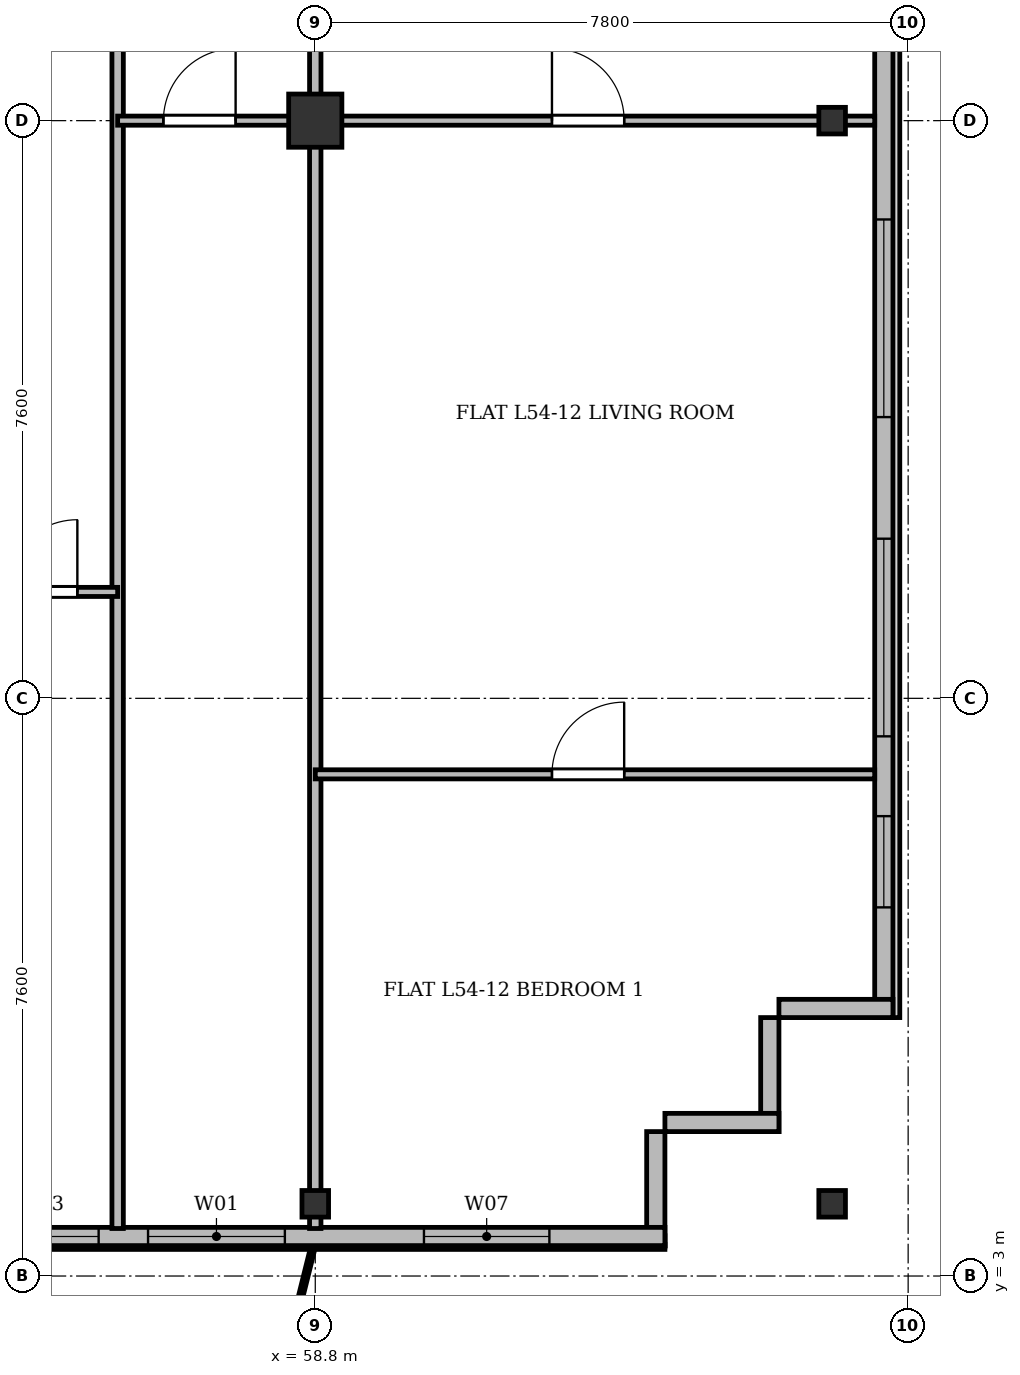
"""IFC4 building model, lengths in metres.
Left out: names, types, materials, properties, quantities, classifications, styles, units other than length and angle.
Written with IfcOpenShell. Run it as: python <this file> out.ifc"""

import sys

from ifc_helpers import new_model, si_unit, direction, frame, frame_2d, origin, origin_2d, place, context, subcontext, project, spatial, rectangle, i_section, extrude, source, transform, mapped, element, fill, save


model = new_model("IFC4")
c1 = context("Model", 3, precision=1e-05, world=origin(), true_north=direction((0.0, 1.0)))
c2 = subcontext(c1, "Body", "Model", "MODEL_VIEW")
j1 = project(units=[si_unit("LENGTHUNIT", "METRE"), si_unit("PLANEANGLEUNIT", "RADIAN")], contexts=[c1])
p1 = place(None, origin())
s1 = spatial("IfcSite", under=j1, at=p1, CompositionType="ELEMENT")
p2 = place(p1, origin())
s2 = spatial("IfcBuilding", under=s1, at=p2, CompositionType="ELEMENT")
p3 = place(p2, frame((0.0, 0.0, 208.5)))
s3 = spatial("IfcBuildingStorey", under=s2, at=p3, CompositionType="ELEMENT", Elevation=208.5)
m1 = source(origin(), c2, "Body", "SweptSolid", [
    extrude(i_section(OverallWidth=0.35, OverallDepth=0.35, WebThickness=0.018, FlangeThickness=0.028, at=origin_2d()), origin(), (0.0, 0.0, 1.0), 3.6),
])
p4 = place(p3, frame((58.8, 3.95, 0.0), z_axis=(0.0, 0.0, 1.0), x_axis=(1.0, 0.0, 0.0)))
e1 = element("IfcColumn", 1, at=p4, inside=s3, PredefinedType="COLUMN", context=c2, shape_type="MappedRepresentation", body=[
    mapped(m1, transform((0.0, 0.0, 0.0), x_axis=(1.0, 0.0, 0.0), y_axis=(0.0, 1.0, 0.0), z_axis=(0.0, 0.0, 1.0), scale=1.0)),
])
m2 = source(origin(), c2, "Body", "SweptSolid", [
    extrude(rectangle(XDim=0.7, YDim=0.7, at=origin_2d()), origin(), (0.0, 0.0, 1.0), 3.6),
])
p5 = place(p3, frame((58.8, 18.2, 0.0), z_axis=(0.0, 0.0, 1.0), x_axis=(1.0, 0.0, 0.0)))
e2 = element("IfcColumn", 2, at=p5, inside=s3, PredefinedType="COLUMN", context=c2, shape_type="MappedRepresentation", body=[
    mapped(m2, transform((0.0, 0.0, 0.0), x_axis=(1.0, 0.0, 0.0), y_axis=(0.0, 1.0, 0.0), z_axis=(0.0, 0.0, 1.0), scale=1.0)),
])
for number, where, z_axis, x_axis in (
    (3, (65.6, 3.95, 0.0), (0.0, 0.0, 1.0), (1.0, 0.0, 0.0)),
    (4, (65.6, 18.2, 0.0), (0.0, 0.0, 1.0), (1.0, 0.0, 0.0)),
):
    element("IfcColumn", number, at=place(p3, frame(where, z_axis=z_axis, x_axis=x_axis)), inside=s3, PredefinedType="COLUMN", context=c2, shape_type="MappedRepresentation", body=[
        mapped(m1, transform((0.0, 0.0, 0.0), x_axis=(1.0, 0.0, 0.0), y_axis=(0.0, 1.0, 0.0), z_axis=(0.0, 0.0, 1.0), scale=1.0)),
    ])
p6 = place(p3, frame((66.28, 45.5, 0.0), z_axis=(0.0, 0.0, 1.0), x_axis=(0.0, -1.0, 0.0)))
e5 = element("IfcWall", 5, at=p6, inside=s3, PredefinedType="SOLIDWALL", context=c2, shape_type="SweptSolid", body=[
    extrude(rectangle(XDim=39.1, YDim=0.24, at=frame_2d((19.55, 0.0))), origin(), (0.0, 0.0, 1.0), 3.36),
])
p7 = place(p6, frame((36.45, 0.0, 0.92)))
e6 = element("IfcOpeningElement", 6, at=p7, cuts=e5, PredefinedType="OPENING", context=c2, shape_type="SweptSolid", body=[
    extrude(rectangle(XDim=1.2, YDim=1.65, at=frame_2d((0.6, 0.825))), frame((0.0, 0.13, 0.0), z_axis=(0.0, -1.0, 0.0), x_axis=(1.0, 0.0, 0.0)), (0.0, 0.0, 1.0), 0.26),
])
p8 = place(p6, frame((32.8, 0.0, 0.92)))
e7 = element("IfcOpeningElement", 7, at=p8, cuts=e5, PredefinedType="OPENING", context=c2, shape_type="SweptSolid", body=[
    extrude(rectangle(XDim=2.6, YDim=1.9, at=frame_2d((1.3, 0.95))), frame((0.0, 0.13, 0.0), z_axis=(0.0, -1.0, 0.0), x_axis=(1.0, 0.0, 0.0)), (0.0, 0.0, 1.0), 0.26),
])
p9 = place(p6, frame((28.6, 0.0, 0.92)))
e8 = element("IfcOpeningElement", 8, at=p9, cuts=e5, PredefinedType="OPENING", context=c2, shape_type="SweptSolid", body=[
    extrude(rectangle(XDim=2.6, YDim=1.9, at=frame_2d((1.3, 0.95))), frame((0.0, 0.13, 0.0), z_axis=(0.0, -1.0, 0.0), x_axis=(1.0, 0.0, 0.0)), (0.0, 0.0, 1.0), 0.26),
])
p10 = place(p6, frame((21.4, 0.0, 0.92)))
e9 = element("IfcOpeningElement", 9, at=p10, cuts=e5, PredefinedType="OPENING", context=c2, shape_type="SweptSolid", body=[
    extrude(rectangle(XDim=2.6, YDim=1.9, at=frame_2d((1.3, 0.95))), frame((0.0, 0.13, 0.0), z_axis=(0.0, -1.0, 0.0), x_axis=(1.0, 0.0, 0.0)), (0.0, 0.0, 1.0), 0.26),
])
p11 = place(p6, frame((7.4, 0.0, 0.92)))
e10 = element("IfcOpeningElement", 10, at=p11, cuts=e5, PredefinedType="OPENING", context=c2, shape_type="SweptSolid", body=[
    extrude(rectangle(XDim=2.6, YDim=1.9, at=frame_2d((1.3, 0.95))), frame((0.0, 0.13, 0.0), z_axis=(0.0, -1.0, 0.0), x_axis=(1.0, 0.0, 0.0)), (0.0, 0.0, 1.0), 0.26),
])
p12 = place(p6, frame((4.5, 0.0, 0.92)))
e11 = element("IfcOpeningElement", 11, at=p12, cuts=e5, PredefinedType="OPENING", context=c2, shape_type="SweptSolid", body=[
    extrude(rectangle(XDim=1.2, YDim=1.65, at=frame_2d((0.6, 0.825))), frame((0.0, 0.13, 0.0), z_axis=(0.0, -1.0, 0.0), x_axis=(1.0, 0.0, 0.0)), (0.0, 0.0, 1.0), 0.26),
])
p13 = place(p6, frame((1.15, 0.0, 0.92)))
e12 = element("IfcOpeningElement", 12, at=p13, cuts=e5, PredefinedType="OPENING", context=c2, shape_type="SweptSolid", body=[
    extrude(rectangle(XDim=1.2, YDim=1.65, at=frame_2d((0.6, 0.825))), frame((0.0, 0.13, 0.0), z_axis=(0.0, -1.0, 0.0), x_axis=(1.0, 0.0, 0.0)), (0.0, 0.0, 1.0), 0.26),
])
p14 = place(p3, frame((66.4, 6.52, 0.0), z_axis=(0.0, 0.0, 1.0), x_axis=(-1.0, 0.0, 0.0)))
e13 = element("IfcWall", 13, at=p14, inside=s3, PredefinedType="SOLIDWALL", context=c2, shape_type="SweptSolid", body=[
    extrude(rectangle(XDim=1.5, YDim=0.24, at=frame_2d((0.75, 0.0))), origin(), (0.0, 0.0, 1.0), 2.86),
])
for number, where, z_axis, x_axis in (
    (14, (64.78, 6.4, 0.0), (0.0, 0.0, 1.0), (0.0, -1.0, 0.0)),
    (15, (64.9, 5.02, 0.0), (0.0, 0.0, 1.0), (-1.0, 0.0, 0.0)),
):
    element("IfcWall", number, at=place(p3, frame(where, z_axis=z_axis, x_axis=x_axis)), inside=s3, PredefinedType="SOLIDWALL", context=c2, shape_type="SweptSolid", body=[
        extrude(rectangle(XDim=1.5, YDim=0.24, at=frame_2d((0.75, 0.0))), origin(), (0.0, 0.0, 1.0), 3.36),
    ])
p15 = place(p3, frame((63.28, 4.9, 0.0), z_axis=(0.0, 0.0, 1.0), x_axis=(0.0, -1.0, 0.0)))
e16 = element("IfcWall", 16, at=p15, inside=s3, PredefinedType="SOLIDWALL", context=c2, shape_type="SweptSolid", body=[
    extrude(rectangle(XDim=1.5, YDim=0.24, at=frame_2d((0.75, 0.0))), origin(), (0.0, 0.0, 1.0), 2.91),
])
p16 = place(p3, frame((63.4, 3.52, 0.0), z_axis=(0.0, 0.0, 1.0), x_axis=(-1.0, 0.0, 0.0)))
e17 = element("IfcWall", 17, at=p16, inside=s3, PredefinedType="SOLIDWALL", context=c2, shape_type="SweptSolid", body=[
    extrude(rectangle(XDim=52.4, YDim=0.24, at=frame_2d((26.2, 0.0))), origin(), (0.0, 0.0, 1.0), 3.36),
])
p17 = place(p16, frame((1.52, 0.0, 0.9)))
e18 = element("IfcOpeningElement", 18, at=p17, cuts=e17, PredefinedType="OPENING", context=c2, shape_type="SweptSolid", body=[
    extrude(rectangle(XDim=1.65, YDim=1.85, at=frame_2d((0.825, 0.925))), frame((0.0, 0.13, 0.0), z_axis=(0.0, -1.0, 0.0), x_axis=(1.0, 0.0, 0.0)), (0.0, 0.0, 1.0), 0.26),
])
p18 = place(p16, frame((5.0, 0.0, 0.9)))
e19 = element("IfcOpeningElement", 19, at=p18, cuts=e17, PredefinedType="OPENING", context=c2, shape_type="SweptSolid", body=[
    extrude(rectangle(XDim=1.8, YDim=1.8, at=frame_2d((0.9, 0.9))), frame((0.0, 0.13, 0.0), z_axis=(0.0, -1.0, 0.0), x_axis=(1.0, 0.0, 0.0)), (0.0, 0.0, 1.0), 0.26),
])
p19 = place(p16, frame((7.45, 0.0, 0.9)))
e20 = element("IfcOpeningElement", 20, at=p19, cuts=e17, PredefinedType="OPENING", context=c2, shape_type="SweptSolid", body=[
    extrude(rectangle(XDim=1.5, YDim=1.75, at=frame_2d((0.75, 0.875))), frame((0.0, 0.13, 0.0), z_axis=(0.0, -1.0, 0.0), x_axis=(1.0, 0.0, 0.0)), (0.0, 0.0, 1.0), 0.26),
])
p20 = place(p16, frame((10.05, 0.0, 0.9)))
e21 = element("IfcOpeningElement", 21, at=p20, cuts=e17, PredefinedType="OPENING", context=c2, shape_type="SweptSolid", body=[
    extrude(rectangle(XDim=1.5, YDim=1.75, at=frame_2d((0.75, 0.875))), frame((0.0, 0.13, 0.0), z_axis=(0.0, -1.0, 0.0), x_axis=(1.0, 0.0, 0.0)), (0.0, 0.0, 1.0), 0.26),
])
p21 = place(p16, frame((14.217, 0.0, 0.0)))
e22 = element("IfcOpeningElement", 22, at=p21, cuts=e17, PredefinedType="OPENING", context=c2, shape_type="SweptSolid", body=[
    extrude(rectangle(XDim=1.2, YDim=2.2, at=frame_2d((0.6, 1.1))), frame((0.0, 0.13, 0.0), z_axis=(0.0, -1.0, 0.0), x_axis=(1.0, 0.0, 0.0)), (0.0, 0.0, 1.0), 0.26),
])
p22 = place(p16, frame((20.108, 0.0, 0.9)))
e23 = element("IfcOpeningElement", 23, at=p22, cuts=e17, PredefinedType="OPENING", context=c2, shape_type="SweptSolid", body=[
    extrude(rectangle(XDim=1.65, YDim=1.85, at=frame_2d((0.825, 0.925))), frame((0.0, 0.13, 0.0), z_axis=(0.0, -1.0, 0.0), x_axis=(1.0, 0.0, 0.0)), (0.0, 0.0, 1.0), 0.26),
])
p23 = place(p16, frame((22.7, 0.0, 0.9)))
e24 = element("IfcOpeningElement", 24, at=p23, cuts=e17, PredefinedType="OPENING", context=c2, shape_type="SweptSolid", body=[
    extrude(rectangle(XDim=1.8, YDim=1.8, at=frame_2d((0.9, 0.9))), frame((0.0, 0.13, 0.0), z_axis=(0.0, -1.0, 0.0), x_axis=(1.0, 0.0, 0.0)), (0.0, 0.0, 1.0), 0.26),
])
p24 = place(p16, frame((25.166, 0.0, 0.9)))
e25 = element("IfcOpeningElement", 25, at=p24, cuts=e17, PredefinedType="OPENING", context=c2, shape_type="SweptSolid", body=[
    extrude(rectangle(XDim=2.2, YDim=1.8, at=frame_2d((1.1, 0.9))), frame((0.0, 0.13, 0.0), z_axis=(0.0, -1.0, 0.0), x_axis=(1.0, 0.0, 0.0)), (0.0, 0.0, 1.0), 0.26),
])
p25 = place(p16, frame((29.45, 0.0, 0.9)))
e26 = element("IfcOpeningElement", 26, at=p25, cuts=e17, PredefinedType="OPENING", context=c2, shape_type="SweptSolid", body=[
    extrude(rectangle(XDim=1.5, YDim=1.75, at=frame_2d((0.75, 0.875))), frame((0.0, 0.13, 0.0), z_axis=(0.0, -1.0, 0.0), x_axis=(1.0, 0.0, 0.0)), (0.0, 0.0, 1.0), 0.26),
])
p26 = place(p16, frame((33.0, 0.0, 0.9)))
e27 = element("IfcOpeningElement", 27, at=p26, cuts=e17, PredefinedType="OPENING", context=c2, shape_type="SweptSolid", body=[
    extrude(rectangle(XDim=2.0, YDim=1.95, at=frame_2d((1.0, 0.975))), frame((0.0, 0.13, 0.0), z_axis=(0.0, -1.0, 0.0), x_axis=(1.0, 0.0, 0.0)), (0.0, 0.0, 1.0), 0.26),
])
p27 = place(p16, frame((35.575, 0.0, 0.9)))
e28 = element("IfcOpeningElement", 28, at=p27, cuts=e17, PredefinedType="OPENING", context=c2, shape_type="SweptSolid", body=[
    extrude(rectangle(XDim=1.65, YDim=1.85, at=frame_2d((0.825, 0.925))), frame((0.0, 0.13, 0.0), z_axis=(0.0, -1.0, 0.0), x_axis=(1.0, 0.0, 0.0)), (0.0, 0.0, 1.0), 0.26),
])
p28 = place(p16, frame((37.9, 0.0, 0.9)))
e29 = element("IfcOpeningElement", 29, at=p28, cuts=e17, PredefinedType="OPENING", context=c2, shape_type="SweptSolid", body=[
    extrude(rectangle(XDim=1.8, YDim=1.8, at=frame_2d((0.9, 0.9))), frame((0.0, 0.13, 0.0), z_axis=(0.0, -1.0, 0.0), x_axis=(1.0, 0.0, 0.0)), (0.0, 0.0, 1.0), 0.26),
])
p29 = place(p16, frame((41.456, 0.0, 0.0)))
e30 = element("IfcOpeningElement", 30, at=p29, cuts=e17, PredefinedType="OPENING", context=c2, shape_type="SweptSolid", body=[
    extrude(rectangle(XDim=1.2, YDim=2.2, at=frame_2d((0.6, 1.1))), frame((0.0, 0.13, 0.0), z_axis=(0.0, -1.0, 0.0), x_axis=(1.0, 0.0, 0.0)), (0.0, 0.0, 1.0), 0.26),
])
p30 = place(p16, frame((43.45, 0.0, 0.9)))
e31 = element("IfcOpeningElement", 31, at=p30, cuts=e17, PredefinedType="OPENING", context=c2, shape_type="SweptSolid", body=[
    extrude(rectangle(XDim=1.5, YDim=1.75, at=frame_2d((0.75, 0.875))), frame((0.0, 0.13, 0.0), z_axis=(0.0, -1.0, 0.0), x_axis=(1.0, 0.0, 0.0)), (0.0, 0.0, 1.0), 0.26),
])
p31 = place(p16, frame((45.5, 0.0, 0.9)))
e32 = element("IfcOpeningElement", 32, at=p31, cuts=e17, PredefinedType="OPENING", context=c2, shape_type="SweptSolid", body=[
    extrude(rectangle(XDim=2.0, YDim=1.95, at=frame_2d((1.0, 0.975))), frame((0.0, 0.13, 0.0), z_axis=(0.0, -1.0, 0.0), x_axis=(1.0, 0.0, 0.0)), (0.0, 0.0, 1.0), 0.26),
])
p32 = place(p16, frame((49.23, 0.0, 0.9)))
e33 = element("IfcOpeningElement", 33, at=p32, cuts=e17, PredefinedType="OPENING", context=c2, shape_type="SweptSolid", body=[
    extrude(rectangle(XDim=1.65, YDim=1.85, at=frame_2d((0.825, 0.925))), frame((0.0, 0.13, 0.0), z_axis=(0.0, -1.0, 0.0), x_axis=(1.0, 0.0, 0.0)), (0.0, 0.0, 1.0), 0.26),
])
p33 = place(p3, frame((58.8, 3.625, 0.0), z_axis=(0.0, 0.0, 1.0), x_axis=(0.0, 1.0, 0.0)))
e34 = element("IfcWall", 34, at=p33, inside=s3, PredefinedType="PARTITIONING", context=c2, shape_type="SweptSolid", body=[
    extrude(rectangle(XDim=27.175, YDim=0.15, at=frame_2d((13.587, 0.0))), origin(), (0.0, 0.0, 1.0), 2.86),
])
p34 = place(p3, frame((56.2, 3.625, 0.0), z_axis=(0.0, 0.0, 1.0), x_axis=(0.0, 1.0, 0.0)))
e35 = element("IfcWall", 35, at=p34, inside=s3, PredefinedType="PARTITIONING", context=c2, shape_type="SweptSolid", body=[
    extrude(rectangle(XDim=27.175, YDim=0.15, at=frame_2d((13.587, 0.0))), origin(), (0.0, 0.0, 1.0), 2.91),
])
p35 = place(p3, frame((54.2, 12.0, 0.0), z_axis=(0.0, 0.0, 1.0), x_axis=(1.0, 0.0, 0.0)))
e36 = element("IfcWall", 36, at=p35, inside=s3, PredefinedType="PARTITIONING", context=c2, shape_type="SweptSolid", body=[
    extrude(rectangle(XDim=2.0, YDim=0.12, at=frame_2d((1.0, 0.0))), origin(), (0.0, 0.0, 1.0), 3.36),
])
p36 = place(p35, frame((0.52, 0.0, 0.0)))
e37 = element("IfcOpeningElement", 37, at=p36, cuts=e36, PredefinedType="OPENING", context=c2, shape_type="SweptSolid", body=[
    extrude(rectangle(XDim=0.95, YDim=2.15, at=frame_2d((0.475, 1.075))), frame((0.0, 0.07, 0.0), z_axis=(0.0, -1.0, 0.0), x_axis=(1.0, 0.0, 0.0)), (0.0, 0.0, 1.0), 0.14),
])
p37 = place(p3, frame((56.2, 18.2, 0.0), z_axis=(0.0, 0.0, 1.0), x_axis=(1.0, 0.0, 0.0)))
e38 = element("IfcWall", 38, at=p37, inside=s3, PredefinedType="PARTITIONING", context=c2, shape_type="SweptSolid", body=[
    extrude(rectangle(XDim=2.6, YDim=0.12, at=frame_2d((1.3, 0.0))), origin(), (0.0, 0.0, 1.0), 2.91),
])
p38 = place(p37, frame((0.602, 0.0, 0.0)))
e39 = element("IfcOpeningElement", 39, at=p38, cuts=e38, PredefinedType="OPENING", context=c2, shape_type="SweptSolid", body=[
    extrude(rectangle(XDim=0.95, YDim=2.15, at=frame_2d((0.475, 1.075))), frame((0.0, 0.07, 0.0), z_axis=(0.0, -1.0, 0.0), x_axis=(1.0, 0.0, 0.0)), (0.0, 0.0, 1.0), 0.14),
])
p39 = place(p3, frame((58.8, 18.2, 0.0), z_axis=(0.0, 0.0, 1.0), x_axis=(1.0, 0.0, 0.0)))
e40 = element("IfcWall", 40, at=p39, inside=s3, PredefinedType="PARTITIONING", context=c2, shape_type="SweptSolid", body=[
    extrude(rectangle(XDim=7.36, YDim=0.12, at=frame_2d((3.68, 0.0))), origin(), (0.0, 0.0, 1.0), 2.91),
])
p40 = place(p39, frame((3.114, 0.0, 0.0)))
e41 = element("IfcOpeningElement", 41, at=p40, cuts=e40, PredefinedType="OPENING", context=c2, shape_type="SweptSolid", body=[
    extrude(rectangle(XDim=0.95, YDim=2.15, at=frame_2d((0.475, 1.075))), frame((0.0, 0.07, 0.0), z_axis=(0.0, -1.0, 0.0), x_axis=(1.0, 0.0, 0.0)), (0.0, 0.0, 1.0), 0.14),
])
p41 = place(p3, frame((58.8, 9.6, 0.0), z_axis=(0.0, 0.0, 1.0), x_axis=(1.0, 0.0, 0.0)))
e42 = element("IfcWall", 42, at=p41, inside=s3, PredefinedType="PARTITIONING", context=c2, shape_type="SweptSolid", body=[
    extrude(rectangle(XDim=7.36, YDim=0.12, at=frame_2d((3.68, 0.0))), origin(), (0.0, 0.0, 1.0), 2.86),
])
p42 = place(p41, frame((3.114, 0.0, 0.0)))
e43 = element("IfcOpeningElement", 43, at=p42, cuts=e42, PredefinedType="OPENING", context=c2, shape_type="SweptSolid", body=[
    extrude(rectangle(XDim=0.95, YDim=2.15, at=frame_2d((0.475, 1.075))), frame((0.0, 0.07, 0.0), z_axis=(0.0, -1.0, 0.0), x_axis=(1.0, 0.0, 0.0)), (0.0, 0.0, 1.0), 0.14),
])
m3 = source(origin(), c2, "Body", "SweptSolid", [
    extrude(rectangle(XDim=1.2, YDim=1.65, at=frame_2d((0.6, 0.825))), frame((0.0, 0.03, 0.0), z_axis=(0.0, -1.0, 0.0), x_axis=(1.0, 0.0, 0.0)), (0.0, 0.0, 1.0), 0.06),
])
p43 = place(p7, origin())
e44 = element("IfcWindow", 44, at=p43, inside=s3, PartitioningType="SINGLE_PANEL", PredefinedType="WINDOW", context=c2, shape_type="MappedRepresentation", body=[
    mapped(m3, transform((0.0, 0.0, 0.0), x_axis=(1.0, 0.0, 0.0), y_axis=(0.0, 1.0, 0.0), z_axis=(0.0, 0.0, 1.0), scale=1.0)),
])
fill(e6, e44)
m4 = source(origin(), c2, "Body", "SweptSolid", [
    extrude(rectangle(XDim=2.6, YDim=1.9, at=frame_2d((1.3, 0.95))), frame((0.0, 0.03, 0.0), z_axis=(0.0, -1.0, 0.0), x_axis=(1.0, 0.0, 0.0)), (0.0, 0.0, 1.0), 0.06),
])
p44 = place(p8, origin())
e45 = element("IfcWindow", 45, at=p44, inside=s3, PartitioningType="SINGLE_PANEL", PredefinedType="WINDOW", context=c2, shape_type="MappedRepresentation", body=[
    mapped(m4, transform((0.0, 0.0, 0.0), x_axis=(1.0, 0.0, 0.0), y_axis=(0.0, 1.0, 0.0), z_axis=(0.0, 0.0, 1.0), scale=1.0)),
])
fill(e7, e45)
p45 = place(p9, origin())
e46 = element("IfcWindow", 46, at=p45, inside=s3, PartitioningType="SINGLE_PANEL", PredefinedType="WINDOW", context=c2, shape_type="MappedRepresentation", body=[
    mapped(m4, transform((0.0, 0.0, 0.0), x_axis=(1.0, 0.0, 0.0), y_axis=(0.0, 1.0, 0.0), z_axis=(0.0, 0.0, 1.0), scale=1.0)),
])
fill(e8, e46)
m5 = source(origin(), c2, "Body", "SweptSolid", [
    extrude(rectangle(XDim=1.65, YDim=1.85, at=frame_2d((0.825, 0.925))), frame((0.0, 0.03, 0.0), z_axis=(0.0, -1.0, 0.0), x_axis=(1.0, 0.0, 0.0)), (0.0, 0.0, 1.0), 0.06),
])
p46 = place(p17, origin())
e47 = element("IfcWindow", 47, at=p46, inside=s3, PartitioningType="SINGLE_PANEL", PredefinedType="WINDOW", context=c2, shape_type="MappedRepresentation", body=[
    mapped(m5, transform((0.0, 0.0, 0.0), x_axis=(1.0, 0.0, 0.0), y_axis=(0.0, 1.0, 0.0), z_axis=(0.0, 0.0, 1.0), scale=1.0)),
])
fill(e18, e47)
m6 = source(origin(), c2, "Body", "SweptSolid", [
    extrude(rectangle(XDim=1.8, YDim=1.8, at=frame_2d((0.9, 0.9))), frame((0.0, 0.03, 0.0), z_axis=(0.0, -1.0, 0.0), x_axis=(1.0, 0.0, 0.0)), (0.0, 0.0, 1.0), 0.06),
])
p47 = place(p18, origin())
e48 = element("IfcWindow", 48, at=p47, inside=s3, PartitioningType="SINGLE_PANEL", PredefinedType="WINDOW", context=c2, shape_type="MappedRepresentation", body=[
    mapped(m6, transform((0.0, 0.0, 0.0), x_axis=(1.0, 0.0, 0.0), y_axis=(0.0, 1.0, 0.0), z_axis=(0.0, 0.0, 1.0), scale=1.0)),
])
fill(e19, e48)
m7 = source(origin(), c2, "Body", "SweptSolid", [
    extrude(rectangle(XDim=1.5, YDim=1.75, at=frame_2d((0.75, 0.875))), frame((0.0, 0.03, 0.0), z_axis=(0.0, -1.0, 0.0), x_axis=(1.0, 0.0, 0.0)), (0.0, 0.0, 1.0), 0.06),
])
p48 = place(p19, origin())
e49 = element("IfcWindow", 49, at=p48, inside=s3, PartitioningType="SINGLE_PANEL", PredefinedType="WINDOW", context=c2, shape_type="MappedRepresentation", body=[
    mapped(m7, transform((0.0, 0.0, 0.0), x_axis=(1.0, 0.0, 0.0), y_axis=(0.0, 1.0, 0.0), z_axis=(0.0, 0.0, 1.0), scale=1.0)),
])
fill(e20, e49)
m8 = source(origin(), c2, "Body", "SweptSolid", [
    extrude(rectangle(XDim=0.95, YDim=2.15, at=frame_2d((0.475, 1.075))), frame((0.0, 0.025, 0.0), z_axis=(0.0, -1.0, 0.0), x_axis=(1.0, 0.0, 0.0)), (0.0, 0.0, 1.0), 0.05),
])
p49 = place(p36, origin())
e50 = element("IfcDoor", 50, at=p49, inside=s3, OperationType="SINGLE_SWING_RIGHT", PredefinedType="DOOR", context=c2, shape_type="MappedRepresentation", body=[
    mapped(m8, transform((0.0, 0.0, 0.0), x_axis=(1.0, 0.0, 0.0), y_axis=(0.0, 1.0, 0.0), z_axis=(0.0, 0.0, 1.0), scale=1.0)),
])
fill(e37, e50)
p50 = place(p38, origin())
e51 = element("IfcDoor", 51, at=p50, inside=s3, OperationType="SINGLE_SWING_RIGHT", PredefinedType="DOOR", context=c2, shape_type="MappedRepresentation", body=[
    mapped(m8, transform((0.0, 0.0, 0.0), x_axis=(1.0, 0.0, 0.0), y_axis=(0.0, 1.0, 0.0), z_axis=(0.0, 0.0, 1.0), scale=1.0)),
])
fill(e39, e51)
p51 = place(p40, origin())
e52 = element("IfcDoor", 52, at=p51, inside=s3, OperationType="SINGLE_SWING_LEFT", PredefinedType="DOOR", context=c2, shape_type="MappedRepresentation", body=[
    mapped(m8, transform((0.0, 0.0, 0.0), x_axis=(1.0, 0.0, 0.0), y_axis=(0.0, 1.0, 0.0), z_axis=(0.0, 0.0, 1.0), scale=1.0)),
])
fill(e41, e52)
p52 = place(p42, origin())
e53 = element("IfcDoor", 53, at=p52, inside=s3, OperationType="SINGLE_SWING_RIGHT", PredefinedType="DOOR", context=c2, shape_type="MappedRepresentation", body=[
    mapped(m8, transform((0.0, 0.0, 0.0), x_axis=(1.0, 0.0, 0.0), y_axis=(0.0, 1.0, 0.0), z_axis=(0.0, 0.0, 1.0), scale=1.0)),
])
fill(e43, e53)
save(model, sys.argv[1])
